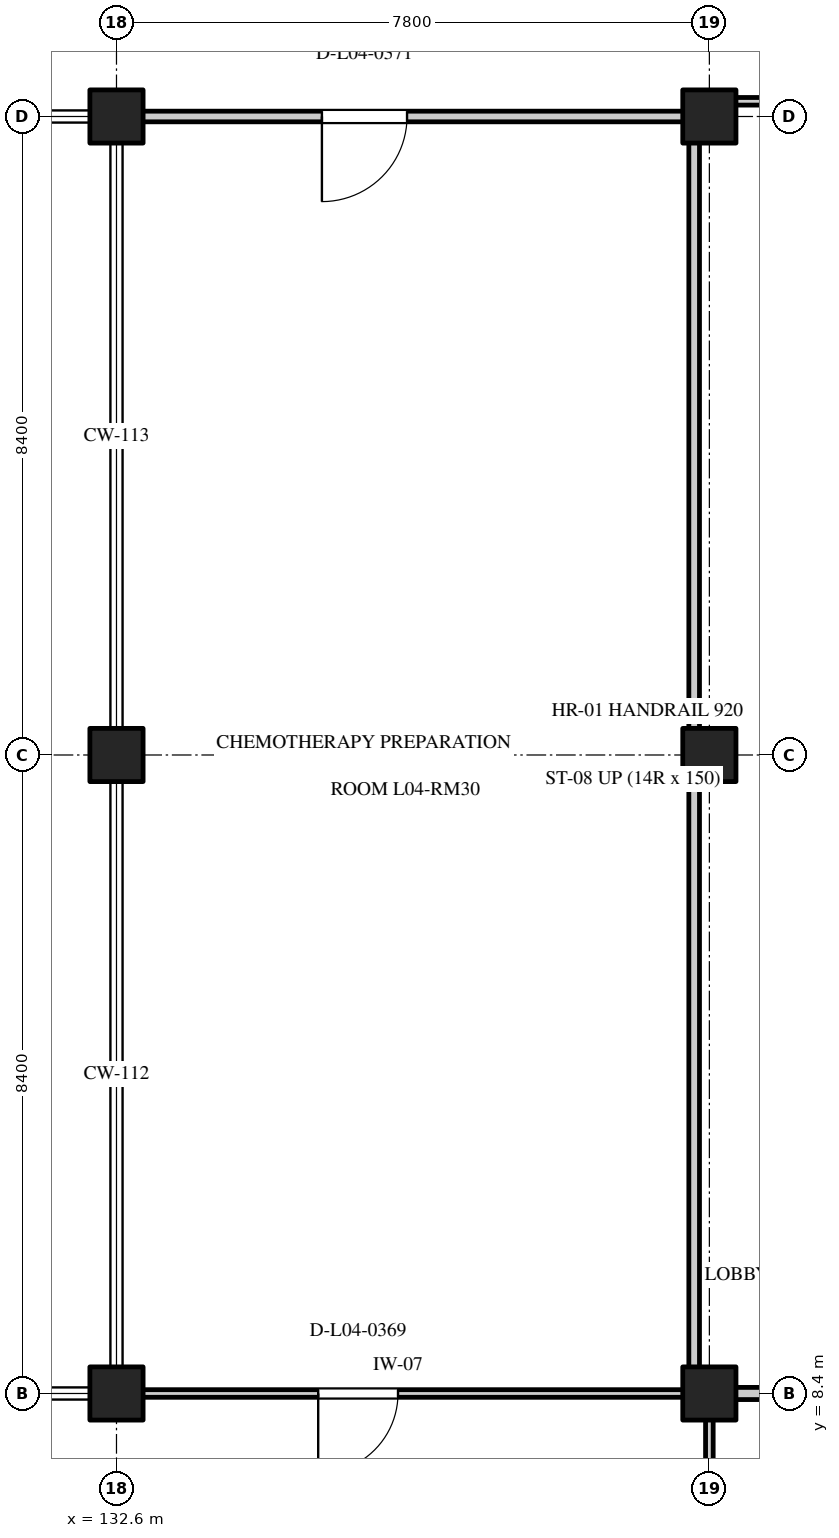
"""IFC4 building model, lengths in metres.
Left out: names, types, materials, properties, quantities, classifications, styles, units other than length and angle.
Written with IfcOpenShell. Run it as: python <this file> out.ifc"""

import sys

from ifc_helpers import new_model, si_unit, direction, frame, frame_2d, origin, origin_2d, place, context, subcontext, project, spatial, rectangle, extrude, element, fill, save


model = new_model("IFC4")
c1 = context("Model", 3, precision=1e-05, world=origin(), true_north=direction((0.0, 1.0)))
c2 = subcontext(c1, "Body", "Model", "MODEL_VIEW")
j1 = project(units=[si_unit("LENGTHUNIT", "METRE"), si_unit("PLANEANGLEUNIT", "RADIAN")], contexts=[c1])
p1 = place(None, origin())
s1 = spatial("IfcSite", under=j1, at=p1, CompositionType="ELEMENT")
p2 = place(p1, origin())
s2 = spatial("IfcBuilding", under=s1, at=p2, CompositionType="ELEMENT")
p3 = place(p2, frame((0.0, 0.0, 18.0)))
s3 = spatial("IfcBuildingStorey", under=s2, at=p3, CompositionType="ELEMENT", Elevation=18.0)
for number, where, z_axis, x_axis in (
    (1, (132.6, 8.4, 0.0), (0.0, 0.0, 1.0), (1.0, 0.0, 0.0)),
    (2, (132.6, 16.8, 0.0), (0.0, 0.0, 1.0), (1.0, 0.0, 0.0)),
    (3, (132.6, 25.2, 0.0), (0.0, 0.0, 1.0), (1.0, 0.0, 0.0)),
    (4, (140.4, 8.4, 0.0), (0.0, 0.0, 1.0), (1.0, 0.0, 0.0)),
    (5, (140.4, 16.8, 0.0), (0.0, 0.0, 1.0), (1.0, 0.0, 0.0)),
    (6, (140.4, 25.2, 0.0), (0.0, 0.0, 1.0), (1.0, 0.0, 0.0)),
):
    element("IfcColumn", number, at=place(p3, frame(where, z_axis=z_axis, x_axis=x_axis)), inside=s3, PredefinedType="COLUMN", context=c2, shape_type="SweptSolid", body=[
        extrude(rectangle(XDim=0.7, YDim=0.7, at=origin_2d()), origin(), (0.0, 0.0, 1.0), 4.2),
    ])
p4 = place(p3, frame((132.29, 8.4, 0.0), z_axis=(0.0, 0.0, 1.0), x_axis=(1.0, 0.0, 0.0)))
e7 = element("IfcWall", 7, at=p4, inside=s3, PredefinedType="PARTITIONING", context=c2, shape_type="SweptSolid", body=[
    extrude(rectangle(XDim=8.025, YDim=0.1, at=frame_2d((4.012, 0.0))), origin(), (0.0, 0.0, 1.0), 3.865),
])
p5 = place(p4, frame((2.964, 0.0, 0.0)))
e8 = element("IfcOpeningElement", 8, at=p5, cuts=e7, PredefinedType="OPENING", context=c2, shape_type="SweptSolid", body=[
    extrude(rectangle(XDim=1.05, YDim=2.1, at=frame_2d((0.525, 1.05))), frame((0.0, 0.062, 0.0), z_axis=(0.0, -1.0, 0.0), x_axis=(1.0, 0.0, 0.0)), (0.0, 0.0, 1.0), 0.124),
])
p6 = place(p3, frame((140.4, 0.085, 0.0), z_axis=(0.0, 0.0, 1.0), x_axis=(0.0, 1.0, 0.0)))
e9 = element("IfcWall", 9, at=p6, inside=s3, PredefinedType="PARTITIONING", context=c2, shape_type="SweptSolid", body=[
    extrude(rectangle(XDim=8.23, YDim=0.1, at=frame_2d((4.115, 0.0))), origin(), (0.0, 0.0, 1.0), 3.865),
])
p7 = place(p3, frame((132.685, 25.2, 0.0), z_axis=(0.0, 0.0, 1.0), x_axis=(1.0, 0.0, 0.0)))
e10 = element("IfcWall", 10, at=p7, inside=s3, PredefinedType="PARTITIONING", context=c2, shape_type="SweptSolid", body=[
    extrude(rectangle(XDim=7.43, YDim=0.14, at=frame_2d((3.715, 0.0))), origin(), (0.0, 0.0, 1.0), 3.235),
])
p8 = place(p7, frame((2.618, 0.0, 0.0)))
e11 = element("IfcOpeningElement", 11, at=p8, cuts=e10, PredefinedType="OPENING", context=c2, shape_type="SweptSolid", body=[
    extrude(rectangle(XDim=1.12, YDim=2.2, at=frame_2d((0.56, 1.1))), frame((0.0, 0.082, 0.0), z_axis=(0.0, -1.0, 0.0), x_axis=(1.0, 0.0, 0.0)), (0.0, 0.0, 1.0), 0.164),
])
p9 = place(p3, frame((132.6, 16.49, 0.0), z_axis=(0.0, 0.0, 1.0), x_axis=(0.0, 1.0, 0.0)))
e12 = element("IfcWall", 12, at=p9, inside=s3, PredefinedType="PARTITIONING", context=c2, shape_type="SweptSolid", body=[
    extrude(rectangle(XDim=0.62, YDim=0.14, at=frame_2d((0.31, 0.0))), origin(), (0.0, 0.0, 1.0), 3.235),
])
p10 = place(p3, frame((140.2, 8.485, 0.0), z_axis=(0.0, 0.0, 1.0), x_axis=(0.0, 1.0, 0.0)))
e13 = element("IfcWall", 13, at=p10, inside=s3, PredefinedType="PARTITIONING", context=c2, shape_type="SweptSolid", body=[
    extrude(rectangle(XDim=16.63, YDim=0.14, at=frame_2d((8.315, 0.0))), origin(), (0.0, 0.0, 1.0), 3.865),
])
p11 = place(p3, frame((140.155, 25.4, 0.0), z_axis=(0.0, 0.0, 1.0), x_axis=(1.0, 0.0, 0.0)))
e14 = element("IfcWall", 14, at=p11, inside=s3, PredefinedType="PARTITIONING", context=c2, shape_type="SweptSolid", body=[
    extrude(rectangle(XDim=7.76, YDim=0.1, at=frame_2d((3.88, 0.0))), origin(), (0.0, 0.0, 1.0), 3.235),
])
p12 = place(p11, frame((2.934, 0.0, 0.0)))
e15 = element("IfcOpeningElement", 15, at=p12, cuts=e14, PredefinedType="OPENING", context=c2, shape_type="SweptSolid", body=[
    extrude(rectangle(XDim=1.22, YDim=2.15, at=frame_2d((0.61, 1.075))), frame((0.0, 0.062, 0.0), z_axis=(0.0, -1.0, 0.0), x_axis=(1.0, 0.0, 0.0)), (0.0, 0.0, 1.0), 0.124),
])
p13 = place(p3, frame((140.485, 8.4, 0.0), z_axis=(0.0, 0.0, 1.0), x_axis=(1.0, 0.0, 0.0)))
e16 = element("IfcWall", 16, at=p13, inside=s3, PredefinedType="PARTITIONING", context=c2, shape_type="SweptSolid", body=[
    extrude(rectangle(XDim=7.43, YDim=0.16, at=frame_2d((3.715, 0.0))), origin(), (0.0, 0.0, 1.0), 3.865),
])
p14 = place(p13, frame((3.88, 0.0, 0.0)))
e17 = element("IfcOpeningElement", 17, at=p14, cuts=e16, PredefinedType="OPENING", context=c2, shape_type="SweptSolid", body=[
    extrude(rectangle(XDim=1.65, YDim=2.25, at=frame_2d((0.825, 1.125))), frame((0.0, 0.092, 0.0), z_axis=(0.0, -1.0, 0.0), x_axis=(1.0, 0.0, 0.0)), (0.0, 0.0, 1.0), 0.184),
])
p15 = place(p5, frame((1.05, 0.0, 0.0), z_axis=(0.0, 0.0, 1.0), x_axis=(-1.0, 0.0, 0.0)))
e18 = element("IfcDoor", 18, at=p15, inside=s3, OperationType="SINGLE_SWING_RIGHT", PredefinedType="DOOR", context=c2, shape_type="SweptSolid", body=[
    extrude(rectangle(XDim=1.05, YDim=2.1, at=frame_2d((0.525, 1.05))), frame((0.0, 0.025, 0.0), z_axis=(0.0, -1.0, 0.0), x_axis=(1.0, 0.0, 0.0)), (0.0, 0.0, 1.0), 0.05),
])
fill(e8, e18)
p16 = place(p8, frame((1.12, 0.0, 0.0), z_axis=(0.0, 0.0, 1.0), x_axis=(-1.0, 0.0, 0.0)))
e19 = element("IfcDoor", 19, at=p16, inside=s3, OperationType="SINGLE_SWING_RIGHT", PredefinedType="DOOR", context=c2, shape_type="SweptSolid", body=[
    extrude(rectangle(XDim=1.12, YDim=2.2, at=frame_2d((0.56, 1.1))), frame((0.0, 0.025, 0.0), z_axis=(0.0, -1.0, 0.0), x_axis=(1.0, 0.0, 0.0)), (0.0, 0.0, 1.0), 0.05),
])
fill(e11, e19)
save(model, sys.argv[1])
